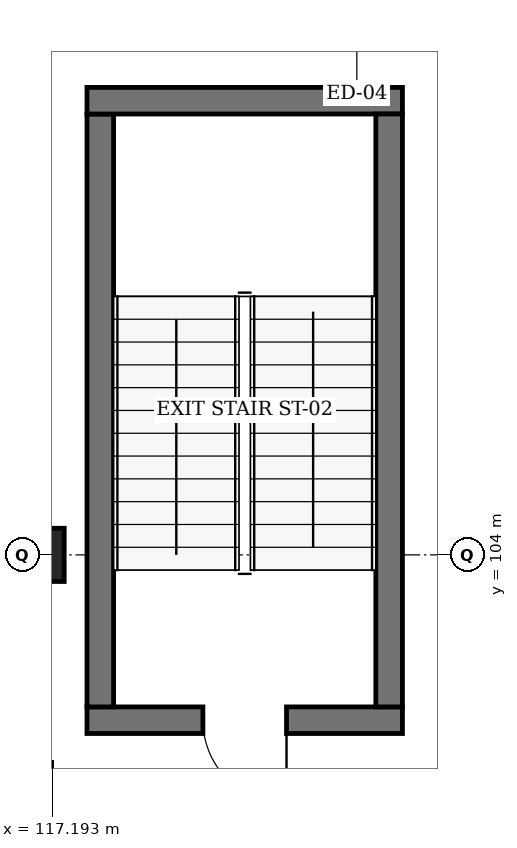
"""IFC4 building model, lengths in metres.
Left out: names, types, materials, properties, quantities, classifications, styles, units other than length and angle.
Written with IfcOpenShell. Run it as: python <this file> out.ifc"""

import sys

from ifc_helpers import new_model, si_unit, direction, frame, frame_2d, origin, origin_2d, place, context, subcontext, project, spatial, rectangle, extrude, element, fill, save


model = new_model("IFC4")
c1 = context("Model", 3, precision=1e-05, world=origin(), true_north=direction((0.0, 1.0)))
c2 = subcontext(c1, "Body", "Model", "MODEL_VIEW")
j1 = project(units=[si_unit("LENGTHUNIT", "METRE"), si_unit("PLANEANGLEUNIT", "RADIAN")], contexts=[c1])
p1 = place(None, origin())
s1 = spatial("IfcSite", under=j1, at=p1, CompositionType="ELEMENT")
p2 = place(p1, origin())
s2 = spatial("IfcBuilding", under=s1, at=p2, CompositionType="ELEMENT")
p3 = place(p2, origin())
s3 = spatial("IfcBuildingStorey", under=s2, at=p3, CompositionType="ELEMENT", Elevation=0.0)
p4 = place(p3, frame((117.0, 104.0, 0.0), z_axis=(0.0, 0.0, 1.0), x_axis=(1.0, 0.0, 0.0)))
e1 = element("IfcColumn", 1, at=p4, inside=s3, PredefinedType="COLUMN", context=c2, shape_type="SweptSolid", body=[
    extrude(rectangle(XDim=0.7, YDim=0.7, at=origin_2d()), origin(), (0.0, 0.0, 1.0), 4.8),
])
p5 = place(p3, frame((121.8, 101.825, 0.0), z_axis=(0.0, 0.0, 1.0), x_axis=(-1.0, 0.0, 0.0)))
e2 = element("IfcWall", 2, at=p5, inside=s3, PredefinedType="SOLIDWALL", context=c2, shape_type="SweptSolid", body=[
    extrude(rectangle(XDim=4.15, YDim=0.35, at=frame_2d((2.075, 0.0))), origin(), (0.0, 0.0, 1.0), 4.8),
])
p6 = place(p5, frame((1.525, 0.0, 0.0)))
e3 = element("IfcOpeningElement", 3, at=p6, cuts=e2, PredefinedType="OPENING", context=c2, shape_type="SweptSolid", body=[
    extrude(rectangle(XDim=1.1, YDim=2.15, at=frame_2d((0.55, 1.075))), frame((0.0, 0.195, 0.0), z_axis=(0.0, -1.0, 0.0), x_axis=(1.0, 0.0, 0.0)), (0.0, 0.0, 1.0), 0.39),
])
p7 = place(p3, frame((117.825, 102.0, 0.0), z_axis=(0.0, 0.0, 1.0), x_axis=(0.0, 1.0, 0.0)))
e4 = element("IfcWall", 4, at=p7, inside=s3, PredefinedType="SOLIDWALL", context=c2, shape_type="SweptSolid", body=[
    extrude(rectangle(XDim=7.8, YDim=0.35, at=frame_2d((3.9, 0.0))), origin(), (0.0, 0.0, 1.0), 4.8),
])
p8 = place(p3, frame((117.65, 109.975, 0.0), z_axis=(0.0, 0.0, 1.0), x_axis=(1.0, 0.0, 0.0)))
e5 = element("IfcWall", 5, at=p8, inside=s3, PredefinedType="SOLIDWALL", context=c2, shape_type="SweptSolid", body=[
    extrude(rectangle(XDim=4.15, YDim=0.35, at=frame_2d((2.075, 0.0))), origin(), (0.0, 0.0, 1.0), 4.8),
])
p9 = place(p3, frame((121.625, 109.8, 0.0), z_axis=(0.0, 0.0, 1.0), x_axis=(0.0, -1.0, 0.0)))
e6 = element("IfcWall", 6, at=p9, inside=s3, PredefinedType="SOLIDWALL", context=c2, shape_type="SweptSolid", body=[
    extrude(rectangle(XDim=7.8, YDim=0.35, at=frame_2d((3.9, 0.0))), origin(), (0.0, 0.0, 1.0), 4.8),
])
p10 = place(p3, frame((117.2, 101.2, 0.0), z_axis=(0.0, 0.0, 1.0), x_axis=(-1.0, 0.0, 0.0)))
e7 = element("IfcWall", 7, at=p10, inside=s3, PredefinedType="PARTITIONING", context=c2, shape_type="SweptSolid", body=[
    extrude(rectangle(XDim=8.8, YDim=0.17, at=frame_2d((4.4, 0.0))), origin(), (0.0, 0.0, 1.0), 4.54),
])
p11 = place(p10, frame((3.35, 0.0, 0.0)))
e8 = element("IfcOpeningElement", 8, at=p11, cuts=e7, PredefinedType="OPENING", context=c2, shape_type="SweptSolid", body=[
    extrude(rectangle(XDim=1.1, YDim=2.25, at=frame_2d((0.55, 1.125))), frame((0.0, 0.105, 0.0), z_axis=(0.0, -1.0, 0.0), x_axis=(1.0, 0.0, 0.0)), (0.0, 0.0, 1.0), 0.21),
])
p12 = place(p6, origin())
e9 = element("IfcDoor", 9, at=p12, inside=s3, OperationType="SINGLE_SWING_LEFT", PredefinedType="DOOR", context=c2, shape_type="SweptSolid", body=[
    extrude(rectangle(XDim=1.1, YDim=2.15, at=frame_2d((0.55, 1.075))), frame((0.0, 0.025, 0.0), z_axis=(0.0, -1.0, 0.0), x_axis=(1.0, 0.0, 0.0)), (0.0, 0.0, 1.0), 0.05),
])
fill(e3, e9)
save(model, sys.argv[1])
